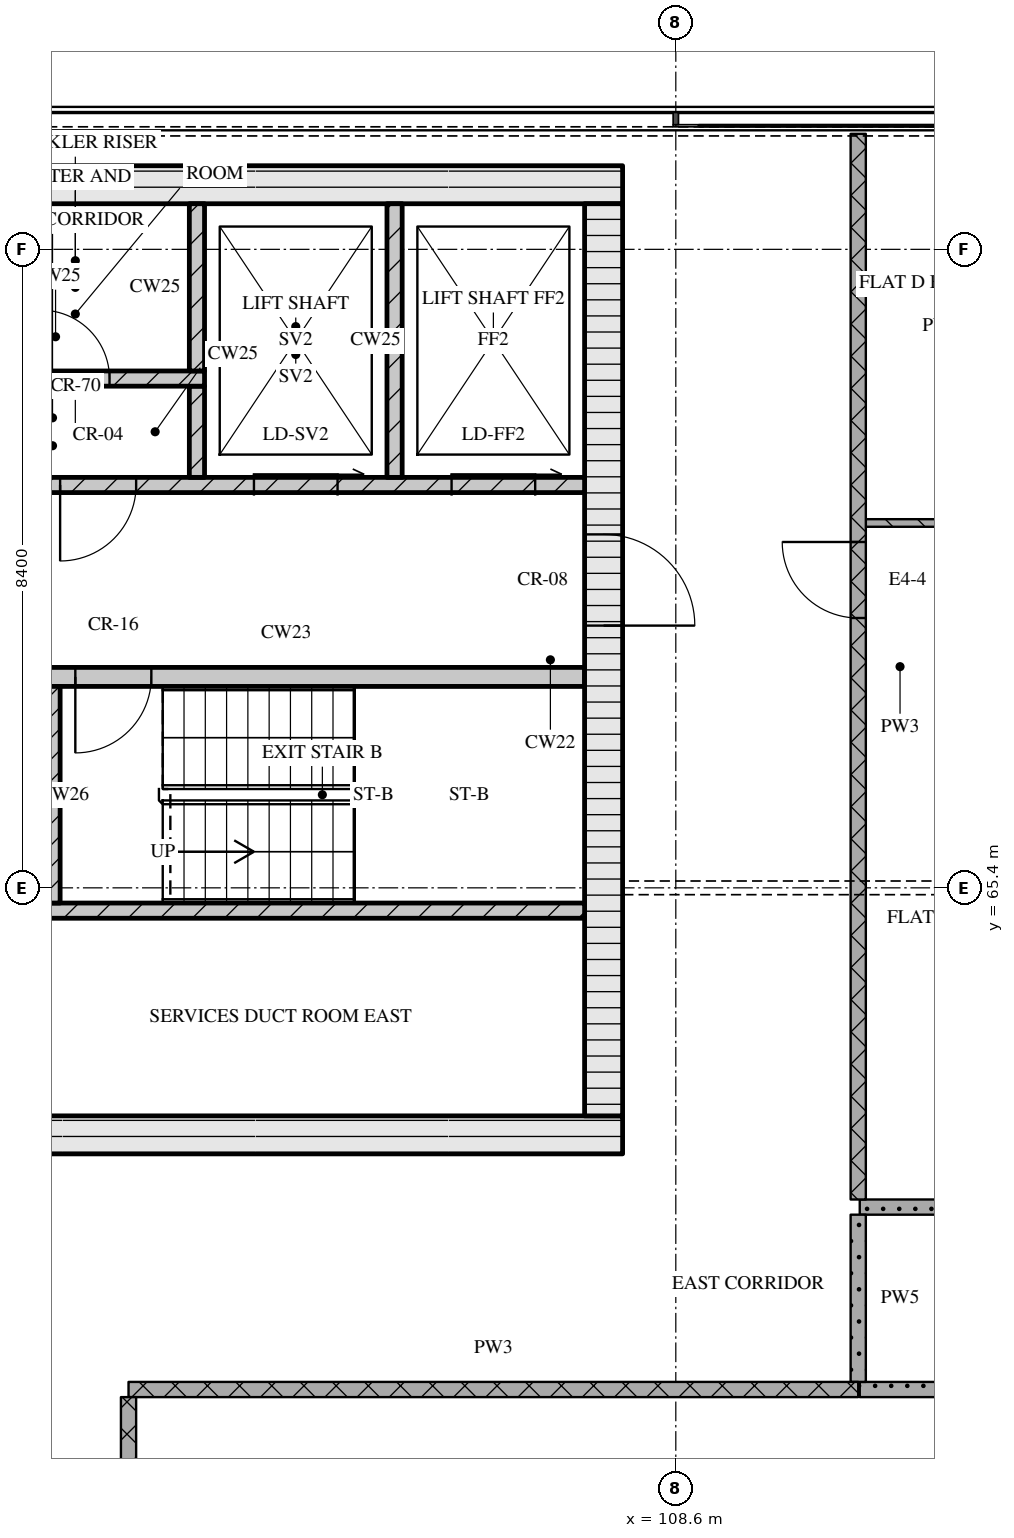
"""IFC4 building model, lengths in metres.
Left out: names, types, materials, properties, quantities, classifications, styles, units other than length and angle.
Written with IfcOpenShell. Run it as: python <this file> out.ifc"""

import sys

from ifc_helpers import new_model, si_unit, direction, frame, frame_2d, origin, place, context, subcontext, project, spatial, rectangle, extrude, element, fill, save


model = new_model("IFC4")
c1 = context("Model", 3, precision=1e-05, world=origin(), true_north=direction((0.0, 1.0)))
c2 = subcontext(c1, "Body", "Model", "MODEL_VIEW")
j1 = project(units=[si_unit("LENGTHUNIT", "METRE"), si_unit("PLANEANGLEUNIT", "RADIAN")], contexts=[c1])
p1 = place(None, origin())
s1 = spatial("IfcSite", under=j1, at=p1, CompositionType="ELEMENT")
p2 = place(p1, origin())
s2 = spatial("IfcBuilding", under=s1, at=p2, CompositionType="ELEMENT")
p3 = place(p2, frame((0.0, 0.0, 285.15)))
s3 = spatial("IfcBuildingStorey", under=s2, at=p3, CompositionType="ELEMENT", Elevation=285.15)
p4 = place(p3, frame((67.3, 62.15, 0.0), z_axis=(0.0, 0.0, 1.0), x_axis=(1.0, 0.0, 0.0)))
e1 = element("IfcWall", 1, at=p4, inside=s3, PredefinedType="SOLIDWALL", context=c2, shape_type="SweptSolid", body=[
    extrude(rectangle(XDim=40.6, YDim=0.5, at=frame_2d((20.3, 0.0))), origin(), (0.0, 0.0, 1.0), 3.32),
])
p5 = place(p4, frame((20.65, 0.0, 0.0)))
e2 = element("IfcOpeningElement", 2, at=p5, cuts=e1, PredefinedType="OPENING", context=c2, shape_type="SweptSolid", body=[
    extrude(rectangle(XDim=1.8, YDim=2.1, at=frame_2d((0.9, 1.05))), frame((0.0, 0.26, 0.0), z_axis=(0.0, -1.0, 0.0), x_axis=(1.0, 0.0, 0.0)), (0.0, 0.0, 1.0), 0.52),
])
p6 = place(p3, frame((67.3, 74.65, 0.0), z_axis=(0.0, 0.0, 1.0), x_axis=(1.0, 0.0, 0.0)))
e3 = element("IfcWall", 3, at=p6, inside=s3, PredefinedType="SOLIDWALL", context=c2, shape_type="SweptSolid", body=[
    extrude(rectangle(XDim=40.6, YDim=0.5, at=frame_2d((20.3, 0.0))), origin(), (0.0, 0.0, 1.0), 3.32),
])
p7 = place(p3, frame((107.65, 62.4, 0.0), z_axis=(0.0, 0.0, 1.0), x_axis=(0.0, 1.0, 0.0)))
e4 = element("IfcWall", 4, at=p7, inside=s3, PredefinedType="SOLIDWALL", context=c2, shape_type="SweptSolid", body=[
    extrude(rectangle(XDim=12.0, YDim=0.5, at=frame_2d((6.0, 0.0))), origin(), (0.0, 0.0, 1.0), 3.32),
])
p8 = place(p7, frame((6.45, 0.0, 0.0)))
e5 = element("IfcOpeningElement", 5, at=p8, cuts=e4, PredefinedType="OPENING", context=c2, shape_type="SweptSolid", body=[
    extrude(rectangle(XDim=1.2, YDim=2.1, at=frame_2d((0.6, 1.05))), frame((0.0, 0.26, 0.0), z_axis=(0.0, -1.0, 0.0), x_axis=(1.0, 0.0, 0.0)), (0.0, 0.0, 1.0), 0.52),
])
p9 = place(p3, frame((91.4, 65.1, 0.0), z_axis=(0.0, 0.0, 1.0), x_axis=(1.0, 0.0, 0.0)))
e6 = element("IfcWall", 6, at=p9, inside=s3, PredefinedType="SOLIDWALL", context=c2, shape_type="SweptSolid", body=[
    extrude(rectangle(XDim=16.0, YDim=0.2, at=frame_2d((8.0, 0.0))), origin(), (0.0, 0.0, 1.0), 3.32),
])
p10 = place(p9, frame((0.85, 0.0, 0.0)))
e7 = element("IfcOpeningElement", 7, at=p10, cuts=e6, PredefinedType="OPENING", context=c2, shape_type="SweptSolid", body=[
    extrude(rectangle(XDim=1.1, YDim=2.1, at=frame_2d((0.55, 1.05))), frame((0.0, 0.11, 0.0), z_axis=(0.0, -1.0, 0.0), x_axis=(1.0, 0.0, 0.0)), (0.0, 0.0, 1.0), 0.22),
])
p11 = place(p9, frame((3.35, 0.0, 0.0)))
e8 = element("IfcOpeningElement", 8, at=p11, cuts=e6, PredefinedType="OPENING", context=c2, shape_type="SweptSolid", body=[
    extrude(rectangle(XDim=1.1, YDim=2.1, at=frame_2d((0.55, 1.05))), frame((0.0, 0.11, 0.0), z_axis=(0.0, -1.0, 0.0), x_axis=(1.0, 0.0, 0.0)), (0.0, 0.0, 1.0), 0.22),
])
p12 = place(p9, frame((5.85, 0.0, 0.0)))
e9 = element("IfcOpeningElement", 9, at=p12, cuts=e6, PredefinedType="OPENING", context=c2, shape_type="SweptSolid", body=[
    extrude(rectangle(XDim=1.1, YDim=2.1, at=frame_2d((0.55, 1.05))), frame((0.0, 0.11, 0.0), z_axis=(0.0, -1.0, 0.0), x_axis=(1.0, 0.0, 0.0)), (0.0, 0.0, 1.0), 0.22),
])
p13 = place(p9, frame((7.83, 0.0, 0.0)))
e10 = element("IfcOpeningElement", 10, at=p13, cuts=e6, PredefinedType="OPENING", context=c2, shape_type="SweptSolid", body=[
    extrude(rectangle(XDim=0.9, YDim=2.1, at=frame_2d((0.45, 1.05))), frame((0.0, 0.11, 0.0), z_axis=(0.0, -1.0, 0.0), x_axis=(1.0, 0.0, 0.0)), (0.0, 0.0, 1.0), 0.22),
])
p14 = place(p3, frame((100.35, 65.2, 0.0), z_axis=(0.0, 0.0, 1.0), x_axis=(0.0, 1.0, 0.0)))
e11 = element("IfcWall", 11, at=p14, inside=s3, PredefinedType="SOLIDWALL", context=c2, shape_type="SweptSolid", body=[
    extrude(rectangle(XDim=2.85, YDim=0.3, at=frame_2d((1.425, 0.0))), origin(), (0.0, 0.0, 1.0), 3.32),
])
p15 = place(p3, frame((98.95, 68.175, 0.0), z_axis=(0.0, 0.0, 1.0), x_axis=(1.0, 0.0, 0.0)))
e12 = element("IfcWall", 12, at=p15, inside=s3, PredefinedType="SOLIDWALL", context=c2, shape_type="SweptSolid", body=[
    extrude(rectangle(XDim=8.45, YDim=0.25, at=frame_2d((4.225, 0.0))), origin(), (0.0, 0.0, 1.0), 3.32),
])
p16 = place(p15, frame((0.45, 0.0, 0.0)))
e13 = element("IfcOpeningElement", 13, at=p16, cuts=e12, PredefinedType="OPENING", context=c2, shape_type="SweptSolid", body=[
    extrude(rectangle(XDim=0.8, YDim=2.1, at=frame_2d((0.4, 1.05))), frame((0.0, 0.135, 0.0), z_axis=(0.0, -1.0, 0.0), x_axis=(1.0, 0.0, 0.0)), (0.0, 0.0, 1.0), 0.27),
])
p17 = place(p15, frame((1.75, 0.0, 0.0)))
e14 = element("IfcOpeningElement", 14, at=p17, cuts=e12, PredefinedType="OPENING", context=c2, shape_type="SweptSolid", body=[
    extrude(rectangle(XDim=1.0, YDim=2.1, at=frame_2d((0.5, 1.05))), frame((0.0, 0.135, 0.0), z_axis=(0.0, -1.0, 0.0), x_axis=(1.0, 0.0, 0.0)), (0.0, 0.0, 1.0), 0.27),
])
p18 = place(p3, frame((67.8, 70.7, 0.0), z_axis=(0.0, 0.0, 1.0), x_axis=(1.0, 0.0, 0.0)))
e15 = element("IfcWall", 15, at=p18, inside=s3, PredefinedType="SOLIDWALL", context=c2, shape_type="SweptSolid", body=[
    extrude(rectangle(XDim=39.6, YDim=0.2, at=frame_2d((19.8, 0.0))), origin(), (0.0, 0.0, 1.0), 3.32),
])
p19 = place(p18, frame((0.65, 0.0, 0.0)))
e16 = element("IfcOpeningElement", 16, at=p19, cuts=e15, PredefinedType="OPENING", context=c2, shape_type="SweptSolid", body=[
    extrude(rectangle(XDim=1.1, YDim=2.1, at=frame_2d((0.55, 1.05))), frame((0.0, 0.11, 0.0), z_axis=(0.0, -1.0, 0.0), x_axis=(1.0, 0.0, 0.0)), (0.0, 0.0, 1.0), 0.22),
])
p20 = place(p18, frame((3.25, 0.0, 0.0)))
e17 = element("IfcOpeningElement", 17, at=p20, cuts=e15, PredefinedType="OPENING", context=c2, shape_type="SweptSolid", body=[
    extrude(rectangle(XDim=1.1, YDim=2.1, at=frame_2d((0.55, 1.05))), frame((0.0, 0.11, 0.0), z_axis=(0.0, -1.0, 0.0), x_axis=(1.0, 0.0, 0.0)), (0.0, 0.0, 1.0), 0.22),
])
p21 = place(p18, frame((5.9, 0.0, 0.0)))
e18 = element("IfcOpeningElement", 18, at=p21, cuts=e15, PredefinedType="OPENING", context=c2, shape_type="SweptSolid", body=[
    extrude(rectangle(XDim=1.0, YDim=2.1, at=frame_2d((0.5, 1.05))), frame((0.0, 0.11, 0.0), z_axis=(0.0, -1.0, 0.0), x_axis=(1.0, 0.0, 0.0)), (0.0, 0.0, 1.0), 0.22),
])
p22 = place(p18, frame((21.7, 0.0, 0.0)))
e19 = element("IfcOpeningElement", 19, at=p22, cuts=e15, PredefinedType="OPENING", context=c2, shape_type="SweptSolid", body=[
    extrude(rectangle(XDim=1.0, YDim=2.1, at=frame_2d((0.5, 1.05))), frame((0.0, 0.11, 0.0), z_axis=(0.0, -1.0, 0.0), x_axis=(1.0, 0.0, 0.0)), (0.0, 0.0, 1.0), 0.22),
])
p23 = place(p18, frame((32.7, 0.0, 0.0)))
e20 = element("IfcOpeningElement", 20, at=p23, cuts=e15, PredefinedType="OPENING", context=c2, shape_type="SweptSolid", body=[
    extrude(rectangle(XDim=1.0, YDim=2.1, at=frame_2d((0.5, 1.05))), frame((0.0, 0.11, 0.0), z_axis=(0.0, -1.0, 0.0), x_axis=(1.0, 0.0, 0.0)), (0.0, 0.0, 1.0), 0.22),
])
p24 = place(p18, frame((35.25, 0.0, 0.0)))
e21 = element("IfcOpeningElement", 21, at=p24, cuts=e15, PredefinedType="OPENING", context=c2, shape_type="SweptSolid", body=[
    extrude(rectangle(XDim=1.1, YDim=2.1, at=frame_2d((0.55, 1.05))), frame((0.0, 0.11, 0.0), z_axis=(0.0, -1.0, 0.0), x_axis=(1.0, 0.0, 0.0)), (0.0, 0.0, 1.0), 0.22),
])
p25 = place(p18, frame((37.85, 0.0, 0.0)))
e22 = element("IfcOpeningElement", 22, at=p25, cuts=e15, PredefinedType="OPENING", context=c2, shape_type="SweptSolid", body=[
    extrude(rectangle(XDim=1.1, YDim=2.1, at=frame_2d((0.55, 1.05))), frame((0.0, 0.11, 0.0), z_axis=(0.0, -1.0, 0.0), x_axis=(1.0, 0.0, 0.0)), (0.0, 0.0, 1.0), 0.22),
])
p26 = place(p3, frame((102.3, 70.8, 0.0), z_axis=(0.0, 0.0, 1.0), x_axis=(0.0, 1.0, 0.0)))
e23 = element("IfcWall", 23, at=p26, inside=s3, PredefinedType="SOLIDWALL", context=c2, shape_type="SweptSolid", body=[
    extrude(rectangle(XDim=1.2, YDim=0.2, at=frame_2d((0.6, 0.0))), origin(), (0.0, 0.0, 1.0), 3.32),
])
p27 = place(p3, frame((104.9, 70.8, 0.0), z_axis=(0.0, 0.0, 1.0), x_axis=(0.0, 1.0, 0.0)))
e24 = element("IfcWall", 24, at=p27, inside=s3, PredefinedType="SOLIDWALL", context=c2, shape_type="SweptSolid", body=[
    extrude(rectangle(XDim=3.6, YDim=0.2, at=frame_2d((1.8, 0.0))), origin(), (0.0, 0.0, 1.0), 3.32),
])
p28 = place(p3, frame((98.48, 72.1, 0.0), z_axis=(0.0, 0.0, 1.0), x_axis=(1.0, 0.0, 0.0)))
e25 = element("IfcWall", 25, at=p28, inside=s3, PredefinedType="SOLIDWALL", context=c2, shape_type="SweptSolid", body=[
    extrude(rectangle(XDim=3.92, YDim=0.2, at=frame_2d((1.96, 0.0))), origin(), (0.0, 0.0, 1.0), 3.32),
])
p29 = place(p28, frame((1.77, 0.0, 0.0)))
e26 = element("IfcOpeningElement", 26, at=p29, cuts=e25, PredefinedType="OPENING", context=c2, shape_type="SweptSolid", body=[
    extrude(rectangle(XDim=0.9, YDim=2.1, at=frame_2d((0.45, 1.05))), frame((0.0, 0.11, 0.0), z_axis=(0.0, -1.0, 0.0), x_axis=(1.0, 0.0, 0.0)), (0.0, 0.0, 1.0), 0.22),
])
p30 = place(p3, frame((102.3, 72.2, 0.0), z_axis=(0.0, 0.0, 1.0), x_axis=(0.0, 1.0, 0.0)))
e27 = element("IfcWall", 27, at=p30, inside=s3, PredefinedType="SOLIDWALL", context=c2, shape_type="SweptSolid", body=[
    extrude(rectangle(XDim=2.2, YDim=0.2, at=frame_2d((1.1, 0.0))), origin(), (0.0, 0.0, 1.0), 3.32),
])
p31 = place(p3, frame((101.4, 58.8, 0.0), z_axis=(0.0, 0.0, 1.0), x_axis=(1.0, 0.0, 0.0)))
e28 = element("IfcWall", 28, at=p31, inside=s3, PredefinedType="PARTITIONING", context=c2, shape_type="SweptSolid", body=[
    extrude(rectangle(XDim=9.6, YDim=0.2, at=frame_2d((4.8, 0.0))), origin(), (0.0, 0.0, 1.0), 3.32),
])
p32 = place(p3, frame((111.02, 58.8, 0.0), z_axis=(0.0, 0.0, 1.0), x_axis=(1.0, 0.0, 0.0)))
e29 = element("IfcWall", 29, at=p32, inside=s3, PredefinedType="PARTITIONING", context=c2, shape_type="SweptSolid", body=[
    extrude(rectangle(XDim=7.48, YDim=0.2, at=frame_2d((3.74, 0.0))), origin(), (0.0, 0.0, 1.0), 3.32),
])
p33 = place(p3, frame((111.02, 61.2, 0.0), z_axis=(0.0, 0.0, 1.0), x_axis=(1.0, 0.0, 0.0)))
e30 = element("IfcWall", 30, at=p33, inside=s3, PredefinedType="PARTITIONING", context=c2, shape_type="SweptSolid", body=[
    extrude(rectangle(XDim=2.66, YDim=0.2, at=frame_2d((1.33, 0.0))), origin(), (0.0, 0.0, 1.0), 3.32),
])
p34 = place(p3, frame((111.1, 70.2, 0.0), z_axis=(0.0, 0.0, 1.0), x_axis=(1.0, 0.0, 0.0)))
e31 = element("IfcWall", 31, at=p34, inside=s3, PredefinedType="PARTITIONING", context=c2, shape_type="SweptSolid", body=[
    extrude(rectangle(XDim=2.6, YDim=0.1, at=frame_2d((1.3, 0.0))), origin(), (0.0, 0.0, 1.0), 3.32),
])
p35 = place(p3, frame((101.4, 58.7, 0.0), z_axis=(0.0, 0.0, 1.0), x_axis=(0.0, -1.0, 0.0)))
e32 = element("IfcWall", 32, at=p35, inside=s3, PredefinedType="PARTITIONING", context=c2, shape_type="SweptSolid", body=[
    extrude(rectangle(XDim=8.0, YDim=0.2, at=frame_2d((4.0, 0.0))), origin(), (0.0, 0.0, 1.0), 3.32),
])
p36 = place(p35, frame((2.85, 0.0, 0.0)))
e33 = element("IfcOpeningElement", 33, at=p36, cuts=e32, PredefinedType="OPENING", context=c2, shape_type="SweptSolid", body=[
    extrude(rectangle(XDim=1.0, YDim=2.1, at=frame_2d((0.5, 1.05))), frame((0.0, 0.11, 0.0), z_axis=(0.0, -1.0, 0.0), x_axis=(1.0, 0.0, 0.0)), (0.0, 0.0, 1.0), 0.22),
])
p37 = place(p3, frame((111.0, 75.32, 0.0), z_axis=(0.0, 0.0, 1.0), x_axis=(0.0, -1.0, 0.0)))
e34 = element("IfcWall", 34, at=p37, inside=s3, PredefinedType="PARTITIONING", context=c2, shape_type="SweptSolid", body=[
    extrude(rectangle(XDim=14.02, YDim=0.2, at=frame_2d((7.01, 0.0))), origin(), (0.0, 0.0, 1.0), 3.32),
])
p38 = place(p37, frame((5.37, 0.0, 0.0)))
e35 = element("IfcOpeningElement", 35, at=p38, cuts=e34, PredefinedType="OPENING", context=c2, shape_type="SweptSolid", body=[
    extrude(rectangle(XDim=1.0, YDim=2.1, at=frame_2d((0.5, 1.05))), frame((0.0, 0.11, 0.0), z_axis=(0.0, -1.0, 0.0), x_axis=(1.0, 0.0, 0.0)), (0.0, 0.0, 1.0), 0.22),
])
p39 = place(p3, frame((111.0, 61.1, 0.0), z_axis=(0.0, 0.0, 1.0), x_axis=(0.0, -1.0, 0.0)))
e36 = element("IfcWall", 36, at=p39, inside=s3, PredefinedType="PARTITIONING", context=c2, shape_type="SweptSolid", body=[
    extrude(rectangle(XDim=2.2, YDim=0.2, at=frame_2d((1.1, 0.0))), origin(), (0.0, 0.0, 1.0), 3.32),
])
p40 = place(p17, origin())
e37 = element("IfcDoor", 37, at=p40, inside=s3, OperationType="SINGLE_SWING_RIGHT", PredefinedType="DOOR", context=c2, shape_type="SweptSolid", body=[
    extrude(rectangle(XDim=1.0, YDim=2.1, at=frame_2d((0.5, 1.05))), frame((0.0, 0.025, 0.0), z_axis=(0.0, -1.0, 0.0), x_axis=(1.0, 0.0, 0.0)), (0.0, 0.0, 1.0), 0.05),
])
fill(e14, e37)
p41 = place(p8, origin())
e38 = element("IfcDoor", 38, at=p41, inside=s3, OperationType="SINGLE_SWING_RIGHT", PredefinedType="DOOR", context=c2, shape_type="SweptSolid", body=[
    extrude(rectangle(XDim=1.2, YDim=2.1, at=frame_2d((0.6, 1.05))), frame((0.0, 0.025, 0.0), z_axis=(0.0, -1.0, 0.0), x_axis=(1.0, 0.0, 0.0)), (0.0, 0.0, 1.0), 0.05),
])
fill(e5, e38)
p42 = place(p23, origin())
e39 = element("IfcDoor", 39, at=p42, inside=s3, OperationType="SINGLE_SWING_RIGHT", PredefinedType="DOOR", context=c2, shape_type="SweptSolid", body=[
    extrude(rectangle(XDim=1.0, YDim=2.1, at=frame_2d((0.5, 1.05))), frame((0.0, 0.025, 0.0), z_axis=(0.0, -1.0, 0.0), x_axis=(1.0, 0.0, 0.0)), (0.0, 0.0, 1.0), 0.05),
])
fill(e20, e39)
p43 = place(p24, origin())
e40 = element("IfcDoor", 40, at=p43, inside=s3, OperationType="SLIDING_TO_RIGHT", PredefinedType="DOOR", context=c2, shape_type="SweptSolid", body=[
    extrude(rectangle(XDim=1.1, YDim=2.1, at=frame_2d((0.55, 1.05))), frame((0.0, 0.025, 0.0), z_axis=(0.0, -1.0, 0.0), x_axis=(1.0, 0.0, 0.0)), (0.0, 0.0, 1.0), 0.05),
])
fill(e21, e40)
p44 = place(p25, origin())
e41 = element("IfcDoor", 41, at=p44, inside=s3, OperationType="SLIDING_TO_RIGHT", PredefinedType="DOOR", context=c2, shape_type="SweptSolid", body=[
    extrude(rectangle(XDim=1.1, YDim=2.1, at=frame_2d((0.55, 1.05))), frame((0.0, 0.025, 0.0), z_axis=(0.0, -1.0, 0.0), x_axis=(1.0, 0.0, 0.0)), (0.0, 0.0, 1.0), 0.05),
])
fill(e22, e41)
p45 = place(p29, origin())
e42 = element("IfcDoor", 42, at=p45, inside=s3, OperationType="SINGLE_SWING_LEFT", PredefinedType="DOOR", context=c2, shape_type="SweptSolid", body=[
    extrude(rectangle(XDim=0.9, YDim=2.1, at=frame_2d((0.45, 1.05))), frame((0.0, 0.025, 0.0), z_axis=(0.0, -1.0, 0.0), x_axis=(1.0, 0.0, 0.0)), (0.0, 0.0, 1.0), 0.05),
])
fill(e26, e42)
p46 = place(p38, origin())
e43 = element("IfcDoor", 43, at=p46, inside=s3, OperationType="SINGLE_SWING_RIGHT", PredefinedType="DOOR", context=c2, shape_type="SweptSolid", body=[
    extrude(rectangle(XDim=1.0, YDim=2.1, at=frame_2d((0.5, 1.05))), frame((0.0, 0.025, 0.0), z_axis=(0.0, -1.0, 0.0), x_axis=(1.0, 0.0, 0.0)), (0.0, 0.0, 1.0), 0.05),
])
fill(e35, e43)
save(model, sys.argv[1])
